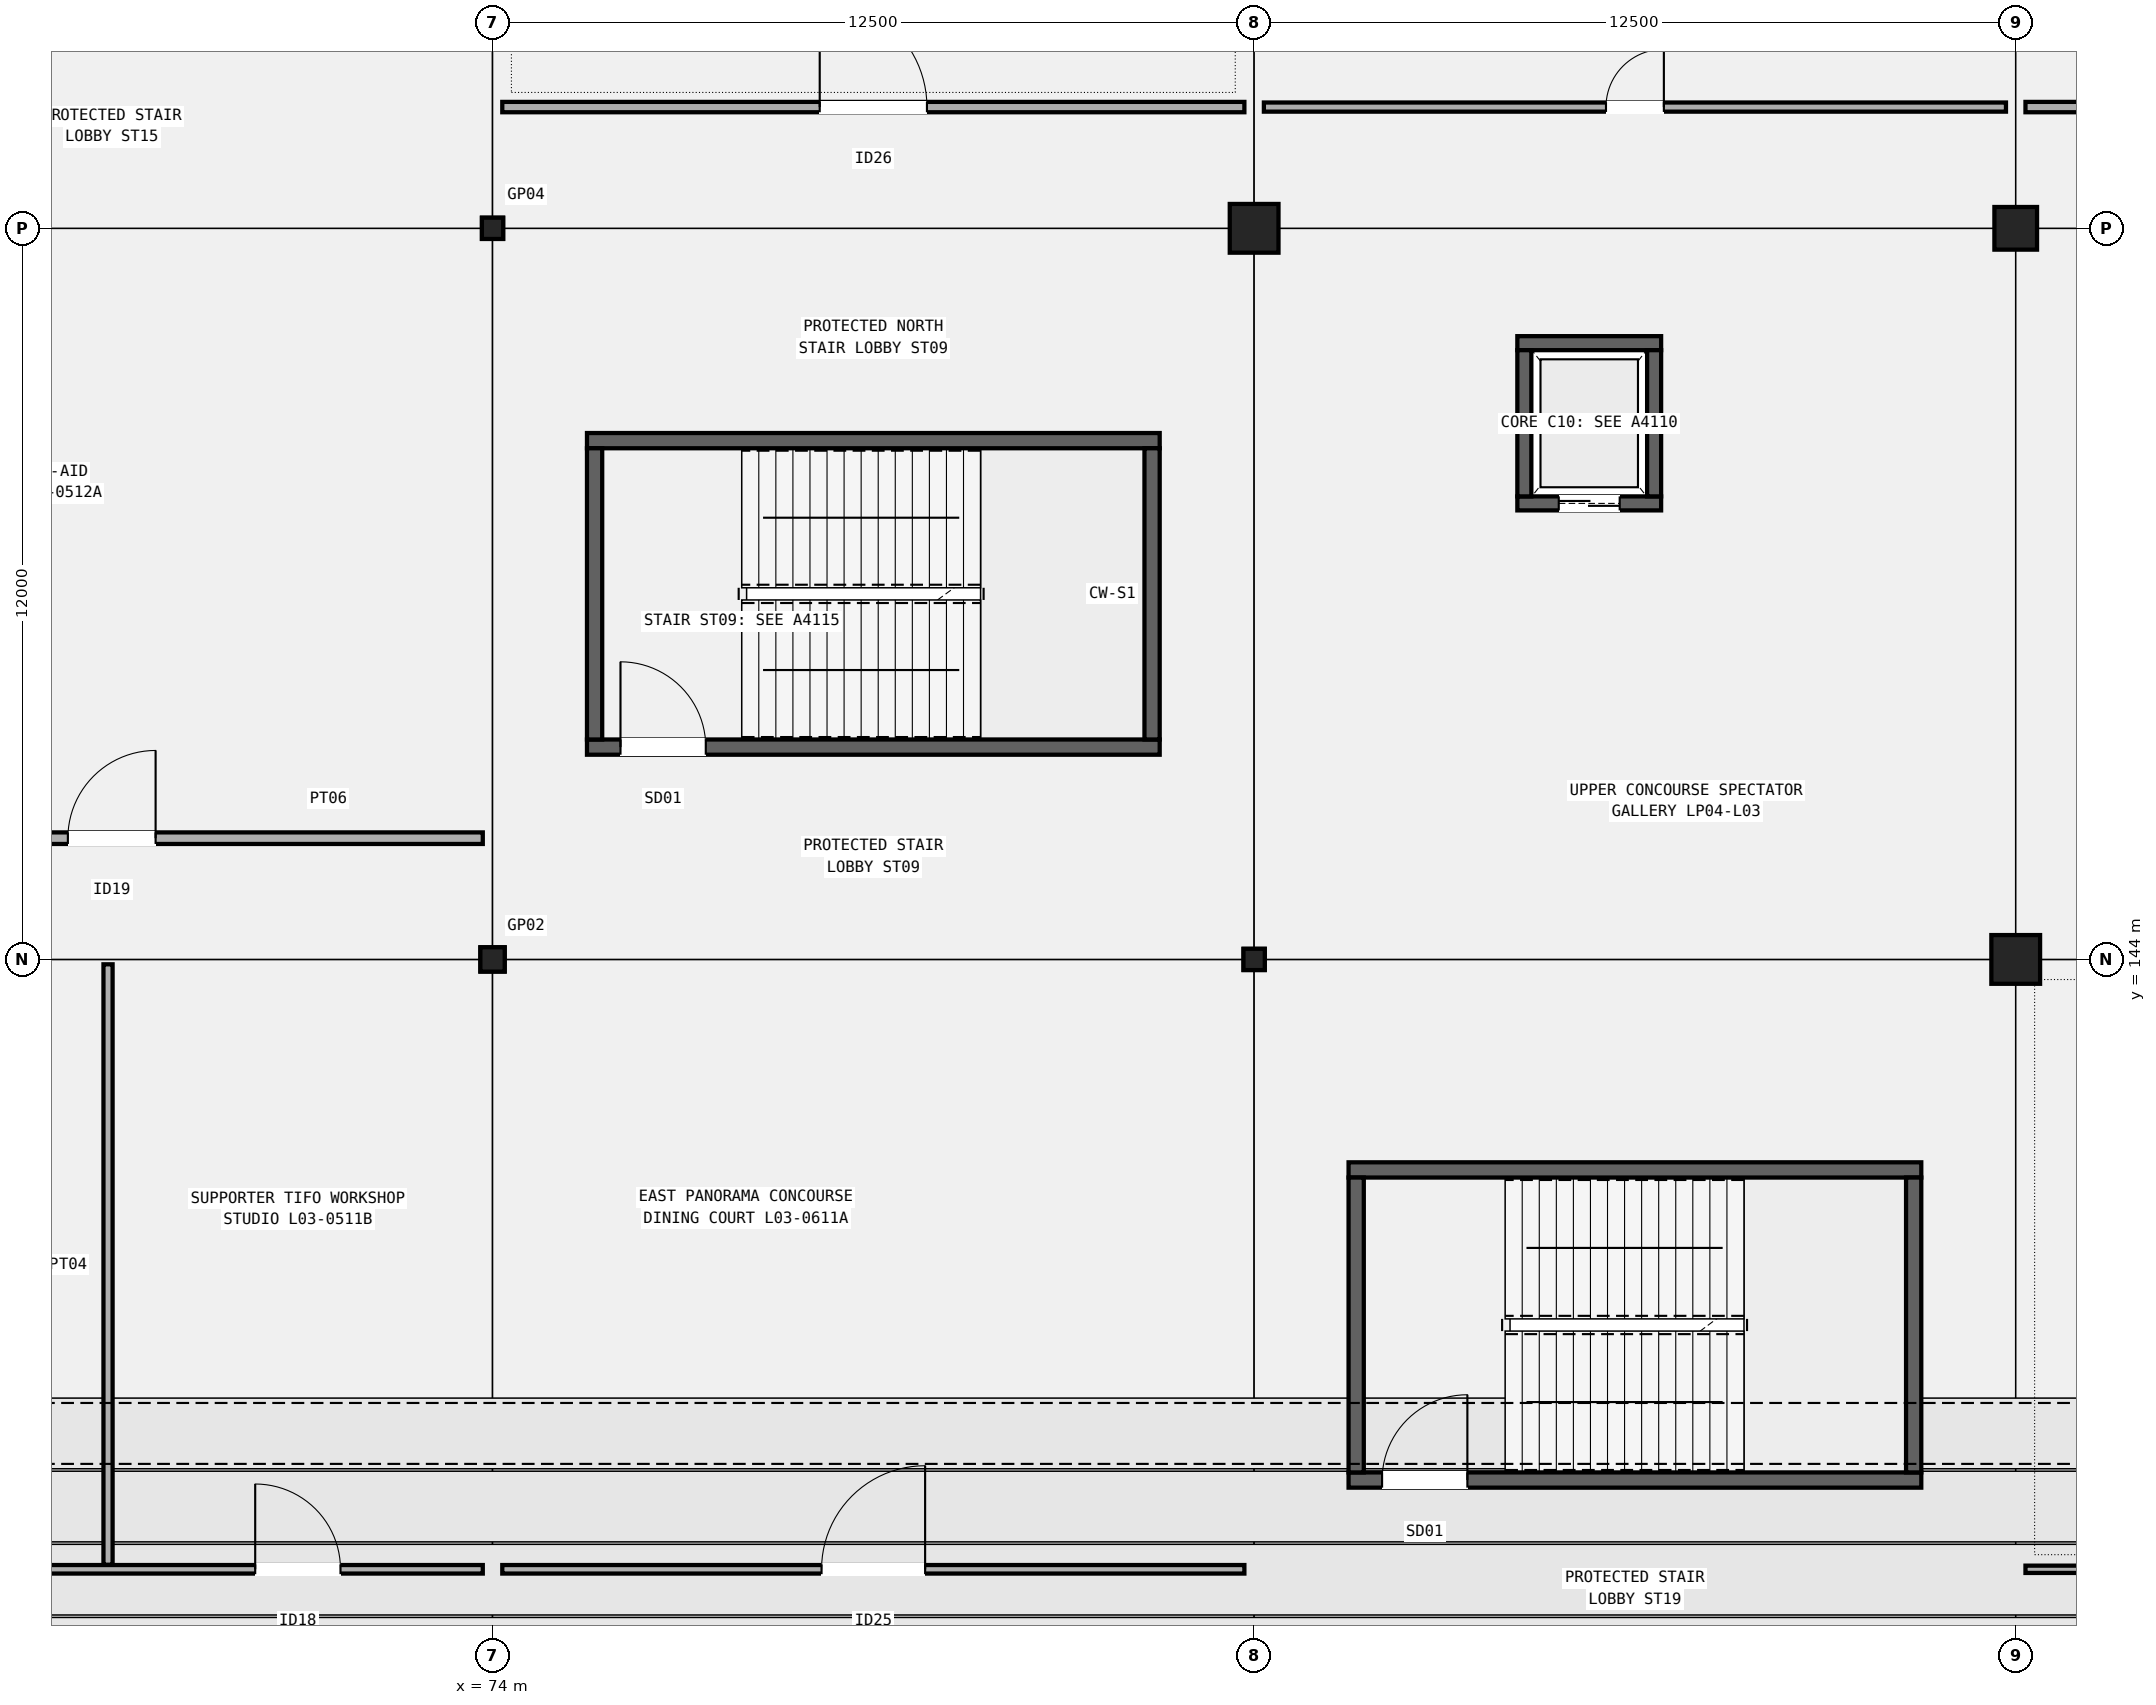
"""IFC4 building model, lengths in metres.
Left out: names, types, materials, properties, quantities, classifications, styles, units other than length and angle.
Written with IfcOpenShell. Run it as: python <this file> out.ifc"""

import sys

from ifc_helpers import new_model, si_unit, direction, frame, frame_2d, origin, origin_2d, place, context, subcontext, project, spatial, rectangle, hollow_rectangle, extrude, element, fill, save


model = new_model("IFC4")
c1 = context("Model", 3, precision=1e-05, world=origin(), true_north=direction((0.0, 1.0)))
c2 = subcontext(c1, "Body", "Model", "MODEL_VIEW")
j1 = project(units=[si_unit("LENGTHUNIT", "METRE"), si_unit("PLANEANGLEUNIT", "RADIAN")], contexts=[c1])
p1 = place(None, origin())
s1 = spatial("IfcSite", under=j1, at=p1, CompositionType="ELEMENT")
p2 = place(p1, origin())
s2 = spatial("IfcBuilding", under=s1, at=p2, CompositionType="ELEMENT")
p3 = place(p2, frame((0.0, 0.0, 15.3)))
s3 = spatial("IfcBuildingStorey", under=s2, at=p3, CompositionType="ELEMENT", Elevation=15.3)
p4 = place(p3, frame((74.0, 144.0, 0.0), z_axis=(0.0, 0.0, 1.0), x_axis=(1.0, 0.0, 0.0)))
e1 = element("IfcColumn", 1, at=p4, inside=s3, PredefinedType="COLUMN", context=c2, shape_type="SweptSolid", body=[
    extrude(hollow_rectangle(XDim=0.4, YDim=0.4, WallThickness=0.016, InnerFilletRadius=0.016, OuterFilletRadius=0.032, at=origin_2d()), origin(), (0.0, 0.0, 1.0), 5.1),
])
for number, where, z_axis, x_axis in (
    (2, (74.0, 156.0, 0.0), (0.0, 0.0, 1.0), (1.0, 0.0, 0.0)),
    (3, (86.5, 144.0, 0.0), (0.0, 0.0, 1.0), (1.0, 0.0, 0.0)),
):
    element("IfcColumn", number, at=place(p3, frame(where, z_axis=z_axis, x_axis=x_axis)), inside=s3, PredefinedType="COLUMN", context=c2, shape_type="SweptSolid", body=[
        extrude(hollow_rectangle(XDim=0.35, YDim=0.35, WallThickness=0.016, InnerFilletRadius=0.016, OuterFilletRadius=0.032, at=origin_2d()), origin(), (0.0, 0.0, 1.0), 5.1),
    ])
for number, where, z_axis, x_axis in (
    (4, (86.5, 156.0, 0.0), (0.0, 0.0, 1.0), (1.0, 0.0, 0.0)),
    (5, (99.0, 144.0, 0.0), (0.0, 0.0, 1.0), (1.0, 0.0, 0.0)),
):
    element("IfcColumn", number, at=place(p3, frame(where, z_axis=z_axis, x_axis=x_axis)), inside=s3, PredefinedType="COLUMN", context=c2, shape_type="SweptSolid", body=[
        extrude(rectangle(XDim=0.8, YDim=0.8, at=origin_2d()), origin(), (0.0, 0.0, 1.0), 5.1),
    ])
p5 = place(p3, frame((99.0, 156.0, 0.0), z_axis=(0.0, 0.0, 1.0), x_axis=(1.0, 0.0, 0.0)))
e6 = element("IfcColumn", 6, at=p5, inside=s3, PredefinedType="COLUMN", context=c2, shape_type="SweptSolid", body=[
    extrude(rectangle(XDim=0.7, YDim=0.7, at=origin_2d()), origin(), (0.0, 0.0, 1.0), 5.1),
])
p6 = place(p3, frame((75.55, 147.485, 0.0), z_axis=(0.0, 0.0, 1.0), x_axis=(1.0, 0.0, 0.0)))
e7 = element("IfcWall", 7, at=p6, inside=s3, PredefinedType="SHEAR", context=c2, shape_type="SweptSolid", body=[
    extrude(rectangle(XDim=9.4, YDim=0.25, at=frame_2d((4.7, 0.0))), origin(), (0.0, 0.0, 1.0), 4.86),
])
p7 = place(p6, frame((0.55, 0.0, 0.0)))
e8 = element("IfcOpeningElement", 8, at=p7, cuts=e7, PredefinedType="OPENING", context=c2, shape_type="SweptSolid", body=[
    extrude(rectangle(XDim=1.4, YDim=2.15, at=frame_2d((0.7, 1.075))), frame((0.0, 0.135, 0.0), z_axis=(0.0, -1.0, 0.0), x_axis=(1.0, 0.0, 0.0)), (0.0, 0.0, 1.0), 0.27),
])
p8 = place(p3, frame((75.55, 152.515, 0.0), z_axis=(0.0, 0.0, 1.0), x_axis=(1.0, 0.0, 0.0)))
e9 = element("IfcWall", 9, at=p8, inside=s3, PredefinedType="SHEAR", context=c2, shape_type="SweptSolid", body=[
    extrude(rectangle(XDim=9.4, YDim=0.25, at=frame_2d((4.7, 0.0))), origin(), (0.0, 0.0, 1.0), 4.86),
])
for number, where, z_axis, x_axis in (
    (10, (75.675, 147.61, 0.0), (0.0, 0.0, 1.0), (0.0, 1.0, 0.0)),
    (11, (84.825, 147.61, 0.0), (0.0, 0.0, 1.0), (0.0, 1.0, 0.0)),
):
    element("IfcWall", number, at=place(p3, frame(where, z_axis=z_axis, x_axis=x_axis)), inside=s3, PredefinedType="SHEAR", context=c2, shape_type="SweptSolid", body=[
        extrude(rectangle(XDim=4.78, YDim=0.25, at=frame_2d((2.39, 0.0))), origin(), (0.0, 0.0, 1.0), 4.86),
    ])
p9 = place(p3, frame((88.05, 135.455, 0.0), z_axis=(0.0, 0.0, 1.0), x_axis=(1.0, 0.0, 0.0)))
e12 = element("IfcWall", 12, at=p9, inside=s3, PredefinedType="SHEAR", context=c2, shape_type="SweptSolid", body=[
    extrude(rectangle(XDim=9.4, YDim=0.25, at=frame_2d((4.7, 0.0))), origin(), (0.0, 0.0, 1.0), 4.86),
])
p10 = place(p9, frame((0.55, 0.0, 0.0)))
e13 = element("IfcOpeningElement", 13, at=p10, cuts=e12, PredefinedType="OPENING", context=c2, shape_type="SweptSolid", body=[
    extrude(rectangle(XDim=1.4, YDim=2.15, at=frame_2d((0.7, 1.075))), frame((0.0, 0.135, 0.0), z_axis=(0.0, -1.0, 0.0), x_axis=(1.0, 0.0, 0.0)), (0.0, 0.0, 1.0), 0.27),
])
p11 = place(p3, frame((88.05, 140.545, 0.0), z_axis=(0.0, 0.0, 1.0), x_axis=(1.0, 0.0, 0.0)))
e14 = element("IfcWall", 14, at=p11, inside=s3, PredefinedType="SHEAR", context=c2, shape_type="SweptSolid", body=[
    extrude(rectangle(XDim=9.4, YDim=0.25, at=frame_2d((4.7, 0.0))), origin(), (0.0, 0.0, 1.0), 4.86),
])
for number, where, z_axis, x_axis in (
    (15, (88.175, 135.58, 0.0), (0.0, 0.0, 1.0), (0.0, 1.0, 0.0)),
    (16, (97.325, 135.58, 0.0), (0.0, 0.0, 1.0), (0.0, 1.0, 0.0)),
):
    element("IfcWall", number, at=place(p3, frame(where, z_axis=z_axis, x_axis=x_axis)), inside=s3, PredefinedType="SHEAR", context=c2, shape_type="SweptSolid", body=[
        extrude(rectangle(XDim=4.84, YDim=0.25, at=frame_2d((2.42, 0.0))), origin(), (0.0, 0.0, 1.0), 4.86),
    ])
p12 = place(p3, frame((90.82, 151.485, 0.0), z_axis=(0.0, 0.0, 1.0), x_axis=(1.0, 0.0, 0.0)))
e17 = element("IfcWall", 17, at=p12, inside=s3, PredefinedType="SHEAR", context=c2, shape_type="SweptSolid", body=[
    extrude(rectangle(XDim=2.36, YDim=0.23, at=frame_2d((1.18, 0.0))), origin(), (0.0, 0.0, 1.0), 4.86),
])
p13 = place(p12, frame((0.68, 0.0, 0.0)))
e18 = element("IfcOpeningElement", 18, at=p13, cuts=e17, PredefinedType="OPENING", context=c2, shape_type="SweptSolid", body=[
    extrude(rectangle(XDim=1.0, YDim=2.15, at=frame_2d((0.5, 1.075))), frame((0.0, 0.125, 0.0), z_axis=(0.0, -1.0, 0.0), x_axis=(1.0, 0.0, 0.0)), (0.0, 0.0, 1.0), 0.25),
])
p14 = place(p3, frame((90.82, 154.115, 0.0), z_axis=(0.0, 0.0, 1.0), x_axis=(1.0, 0.0, 0.0)))
e19 = element("IfcWall", 19, at=p14, inside=s3, PredefinedType="SHEAR", context=c2, shape_type="SweptSolid", body=[
    extrude(rectangle(XDim=2.36, YDim=0.23, at=frame_2d((1.18, 0.0))), origin(), (0.0, 0.0, 1.0), 4.86),
])
for number, where, z_axis, x_axis in (
    (20, (90.935, 151.6, 0.0), (0.0, 0.0, 1.0), (0.0, 1.0, 0.0)),
    (21, (93.065, 151.6, 0.0), (0.0, 0.0, 1.0), (0.0, 1.0, 0.0)),
):
    element("IfcWall", number, at=place(p3, frame(where, z_axis=z_axis, x_axis=x_axis)), inside=s3, PredefinedType="SHEAR", context=c2, shape_type="SweptSolid", body=[
        extrude(rectangle(XDim=2.4, YDim=0.23, at=frame_2d((1.2, 0.0))), origin(), (0.0, 0.0, 1.0), 4.86),
    ])
p15 = place(p3, frame((61.66, 133.99, 0.0), z_axis=(0.0, 0.0, 1.0), x_axis=(1.0, 0.0, 0.0)))
e22 = element("IfcWall", 22, at=p15, inside=s3, PredefinedType="PARTITIONING", context=c2, shape_type="SweptSolid", body=[
    extrude(rectangle(XDim=12.18, YDim=0.14, at=frame_2d((6.09, 0.0))), origin(), (0.0, 0.0, 1.0), 2.77),
])
p16 = place(p15, frame((2.294, 0.0, 0.0)))
e23 = element("IfcOpeningElement", 23, at=p16, cuts=e22, PredefinedType="OPENING", context=c2, shape_type="SweptSolid", body=[
    extrude(rectangle(XDim=1.36, YDim=2.25, at=frame_2d((0.68, 1.125))), frame((0.0, 0.08, 0.0), z_axis=(0.0, -1.0, 0.0), x_axis=(1.0, 0.0, 0.0)), (0.0, 0.0, 1.0), 0.16),
])
p17 = place(p15, frame((8.445, 0.0, 0.0)))
e24 = element("IfcOpeningElement", 24, at=p17, cuts=e22, PredefinedType="OPENING", context=c2, shape_type="SweptSolid", body=[
    extrude(rectangle(XDim=1.4, YDim=2.24, at=frame_2d((0.7, 1.12))), frame((0.0, 0.08, 0.0), z_axis=(0.0, -1.0, 0.0), x_axis=(1.0, 0.0, 0.0)), (0.0, 0.0, 1.0), 0.16),
])
p18 = place(p3, frame((67.689, 134.065, 0.0), z_axis=(0.0, 0.0, 1.0), x_axis=(0.0, 1.0, 0.0)))
e25 = element("IfcWall", 25, at=p18, inside=s3, PredefinedType="PARTITIONING", context=c2, shape_type="SweptSolid", body=[
    extrude(rectangle(XDim=9.855, YDim=0.15, at=frame_2d((4.927, 0.0))), origin(), (0.0, 0.0, 1.0), 2.77),
])
p19 = place(p3, frame((61.66, 145.99, 0.0), z_axis=(0.0, 0.0, 1.0), x_axis=(1.0, 0.0, 0.0)))
e26 = element("IfcWall", 26, at=p19, inside=s3, PredefinedType="PARTITIONING", context=c2, shape_type="SweptSolid", body=[
    extrude(rectangle(XDim=12.18, YDim=0.19, at=frame_2d((6.09, 0.0))), origin(), (0.0, 0.0, 1.0), 4.22),
])
p20 = place(p19, frame((5.37, 0.0, 0.0)))
e27 = element("IfcOpeningElement", 27, at=p20, cuts=e26, PredefinedType="OPENING", context=c2, shape_type="SweptSolid", body=[
    extrude(rectangle(XDim=1.44, YDim=2.26, at=frame_2d((0.72, 1.13))), frame((0.0, 0.105, 0.0), z_axis=(0.0, -1.0, 0.0), x_axis=(1.0, 0.0, 0.0)), (0.0, 0.0, 1.0), 0.21),
])
p21 = place(p3, frame((74.16, 133.99, 0.0), z_axis=(0.0, 0.0, 1.0), x_axis=(1.0, 0.0, 0.0)))
e28 = element("IfcWall", 28, at=p21, inside=s3, PredefinedType="PARTITIONING", context=c2, shape_type="SweptSolid", body=[
    extrude(rectangle(XDim=12.18, YDim=0.14, at=frame_2d((6.09, 0.0))), origin(), (0.0, 0.0, 1.0), 2.77),
])
p22 = place(p21, frame((5.24, 0.0, 0.0)))
e29 = element("IfcOpeningElement", 29, at=p22, cuts=e28, PredefinedType="OPENING", context=c2, shape_type="SweptSolid", body=[
    extrude(rectangle(XDim=1.7, YDim=2.32, at=frame_2d((0.85, 1.16))), frame((0.0, 0.08, 0.0), z_axis=(0.0, -1.0, 0.0), x_axis=(1.0, 0.0, 0.0)), (0.0, 0.0, 1.0), 0.16),
])
p23 = place(p3, frame((74.16, 157.99, 0.0), z_axis=(0.0, 0.0, 1.0), x_axis=(1.0, 0.0, 0.0)))
e30 = element("IfcWall", 30, at=p23, inside=s3, PredefinedType="PARTITIONING", context=c2, shape_type="SweptSolid", body=[
    extrude(rectangle(XDim=12.18, YDim=0.17, at=frame_2d((6.09, 0.0))), origin(), (0.0, 0.0, 1.0), 4.22),
])
p24 = place(p23, frame((5.21, 0.0, 0.0)))
e31 = element("IfcOpeningElement", 31, at=p24, cuts=e30, PredefinedType="OPENING", context=c2, shape_type="SweptSolid", body=[
    extrude(rectangle(XDim=1.76, YDim=2.3, at=frame_2d((0.88, 1.15))), frame((0.0, 0.095, 0.0), z_axis=(0.0, -1.0, 0.0), x_axis=(1.0, 0.0, 0.0)), (0.0, 0.0, 1.0), 0.19),
])
p25 = place(p3, frame((86.66, 157.99, 0.0), z_axis=(0.0, 0.0, 1.0), x_axis=(1.0, 0.0, 0.0)))
e32 = element("IfcWall", 32, at=p25, inside=s3, PredefinedType="PARTITIONING", context=c2, shape_type="SweptSolid", body=[
    extrude(rectangle(XDim=12.18, YDim=0.15, at=frame_2d((6.09, 0.0))), origin(), (0.0, 0.0, 1.0), 4.22),
])
p26 = place(p25, frame((5.615, 0.0, 0.0)))
e33 = element("IfcOpeningElement", 33, at=p26, cuts=e32, PredefinedType="OPENING", context=c2, shape_type="SweptSolid", body=[
    extrude(rectangle(XDim=0.95, YDim=2.12, at=frame_2d((0.475, 1.06))), frame((0.0, 0.085, 0.0), z_axis=(0.0, -1.0, 0.0), x_axis=(1.0, 0.0, 0.0)), (0.0, 0.0, 1.0), 0.17),
])
p27 = place(p3, frame((99.16, 133.99, 0.0), z_axis=(0.0, 0.0, 1.0), x_axis=(1.0, 0.0, 0.0)))
e34 = element("IfcWall", 34, at=p27, inside=s3, PredefinedType="PARTITIONING", context=c2, shape_type="SweptSolid", body=[
    extrude(rectangle(XDim=12.68, YDim=0.12, at=frame_2d((6.34, 0.0))), origin(), (0.0, 0.0, 1.0), 2.77),
])
p28 = place(p27, frame((2.598, 0.0, 0.0)))
e35 = element("IfcOpeningElement", 35, at=p28, cuts=e34, PredefinedType="OPENING", context=c2, shape_type="SweptSolid", body=[
    extrude(rectangle(XDim=1.0, YDim=2.14, at=frame_2d((0.5, 1.07))), frame((0.0, 0.07, 0.0), z_axis=(0.0, -1.0, 0.0), x_axis=(1.0, 0.0, 0.0)), (0.0, 0.0, 1.0), 0.14),
])
p29 = place(p27, frame((9.003, 0.0, 0.0)))
e36 = element("IfcOpeningElement", 36, at=p29, cuts=e34, PredefinedType="OPENING", context=c2, shape_type="SweptSolid", body=[
    extrude(rectangle(XDim=1.03, YDim=2.12, at=frame_2d((0.515, 1.06))), frame((0.0, 0.07, 0.0), z_axis=(0.0, -1.0, 0.0), x_axis=(1.0, 0.0, 0.0)), (0.0, 0.0, 1.0), 0.14),
])
p30 = place(p3, frame((99.16, 157.99, 0.0), z_axis=(0.0, 0.0, 1.0), x_axis=(1.0, 0.0, 0.0)))
e37 = element("IfcWall", 37, at=p30, inside=s3, PredefinedType="PARTITIONING", context=c2, shape_type="SweptSolid", body=[
    extrude(rectangle(XDim=12.68, YDim=0.17, at=frame_2d((6.34, 0.0))), origin(), (0.0, 0.0, 1.0), 4.22),
])
p31 = place(p30, frame((5.81, 0.0, 0.0)))
e38 = element("IfcOpeningElement", 38, at=p31, cuts=e37, PredefinedType="OPENING", context=c2, shape_type="SweptSolid", body=[
    extrude(rectangle(XDim=1.06, YDim=2.15, at=frame_2d((0.53, 1.075))), frame((0.0, 0.095, 0.0), z_axis=(0.0, -1.0, 0.0), x_axis=(1.0, 0.0, 0.0)), (0.0, 0.0, 1.0), 0.19),
])
p32 = place(p7, origin())
e39 = element("IfcDoor", 39, at=p32, inside=s3, OperationType="SINGLE_SWING_LEFT", PredefinedType="DOOR", context=c2, shape_type="SweptSolid", body=[
    extrude(rectangle(XDim=1.4, YDim=2.15, at=frame_2d((0.7, 1.075))), frame((0.0, 0.025, 0.0), z_axis=(0.0, -1.0, 0.0), x_axis=(1.0, 0.0, 0.0)), (0.0, 0.0, 1.0), 0.05),
])
fill(e8, e39)
p33 = place(p10, origin())
e40 = element("IfcDoor", 40, at=p33, inside=s3, OperationType="SINGLE_SWING_RIGHT", PredefinedType="DOOR", context=c2, shape_type="SweptSolid", body=[
    extrude(rectangle(XDim=1.4, YDim=2.15, at=frame_2d((0.7, 1.075))), frame((0.0, 0.025, 0.0), z_axis=(0.0, -1.0, 0.0), x_axis=(1.0, 0.0, 0.0)), (0.0, 0.0, 1.0), 0.05),
])
fill(e13, e40)
p34 = place(p13, origin())
e41 = element("IfcDoor", 41, at=p34, inside=s3, OperationType="DOUBLE_DOOR_SLIDING", PredefinedType="DOOR", context=c2, shape_type="SweptSolid", body=[
    extrude(rectangle(XDim=1.0, YDim=2.15, at=frame_2d((0.5, 1.075))), frame((0.0, 0.025, 0.0), z_axis=(0.0, -1.0, 0.0), x_axis=(1.0, 0.0, 0.0)), (0.0, 0.0, 1.0), 0.05),
])
fill(e18, e41)
p35 = place(p17, origin())
e42 = element("IfcDoor", 42, at=p35, inside=s3, OperationType="SINGLE_SWING_LEFT", PredefinedType="DOOR", context=c2, shape_type="SweptSolid", body=[
    extrude(rectangle(XDim=1.4, YDim=2.24, at=frame_2d((0.7, 1.12))), frame((0.0, 0.025, 0.0), z_axis=(0.0, -1.0, 0.0), x_axis=(1.0, 0.0, 0.0)), (0.0, 0.0, 1.0), 0.05),
])
fill(e24, e42)
p36 = place(p20, origin())
e43 = element("IfcDoor", 43, at=p36, inside=s3, OperationType="SINGLE_SWING_RIGHT", PredefinedType="DOOR", context=c2, shape_type="SweptSolid", body=[
    extrude(rectangle(XDim=1.44, YDim=2.26, at=frame_2d((0.72, 1.13))), frame((0.0, 0.025, 0.0), z_axis=(0.0, -1.0, 0.0), x_axis=(1.0, 0.0, 0.0)), (0.0, 0.0, 1.0), 0.05),
])
fill(e27, e43)
p37 = place(p22, origin())
e44 = element("IfcDoor", 44, at=p37, inside=s3, OperationType="SINGLE_SWING_RIGHT", PredefinedType="DOOR", context=c2, shape_type="SweptSolid", body=[
    extrude(rectangle(XDim=1.7, YDim=2.32, at=frame_2d((0.85, 1.16))), frame((0.0, 0.025, 0.0), z_axis=(0.0, -1.0, 0.0), x_axis=(1.0, 0.0, 0.0)), (0.0, 0.0, 1.0), 0.05),
])
fill(e29, e44)
p38 = place(p24, origin())
e45 = element("IfcDoor", 45, at=p38, inside=s3, OperationType="SINGLE_SWING_LEFT", PredefinedType="DOOR", context=c2, shape_type="SweptSolid", body=[
    extrude(rectangle(XDim=1.76, YDim=2.3, at=frame_2d((0.88, 1.15))), frame((0.0, 0.025, 0.0), z_axis=(0.0, -1.0, 0.0), x_axis=(1.0, 0.0, 0.0)), (0.0, 0.0, 1.0), 0.05),
])
fill(e31, e45)
p39 = place(p26, origin())
e46 = element("IfcDoor", 46, at=p39, inside=s3, OperationType="SINGLE_SWING_RIGHT", PredefinedType="DOOR", context=c2, shape_type="SweptSolid", body=[
    extrude(rectangle(XDim=0.95, YDim=2.12, at=frame_2d((0.475, 1.06))), frame((0.0, 0.025, 0.0), z_axis=(0.0, -1.0, 0.0), x_axis=(1.0, 0.0, 0.0)), (0.0, 0.0, 1.0), 0.05),
])
fill(e33, e46)
save(model, sys.argv[1])
